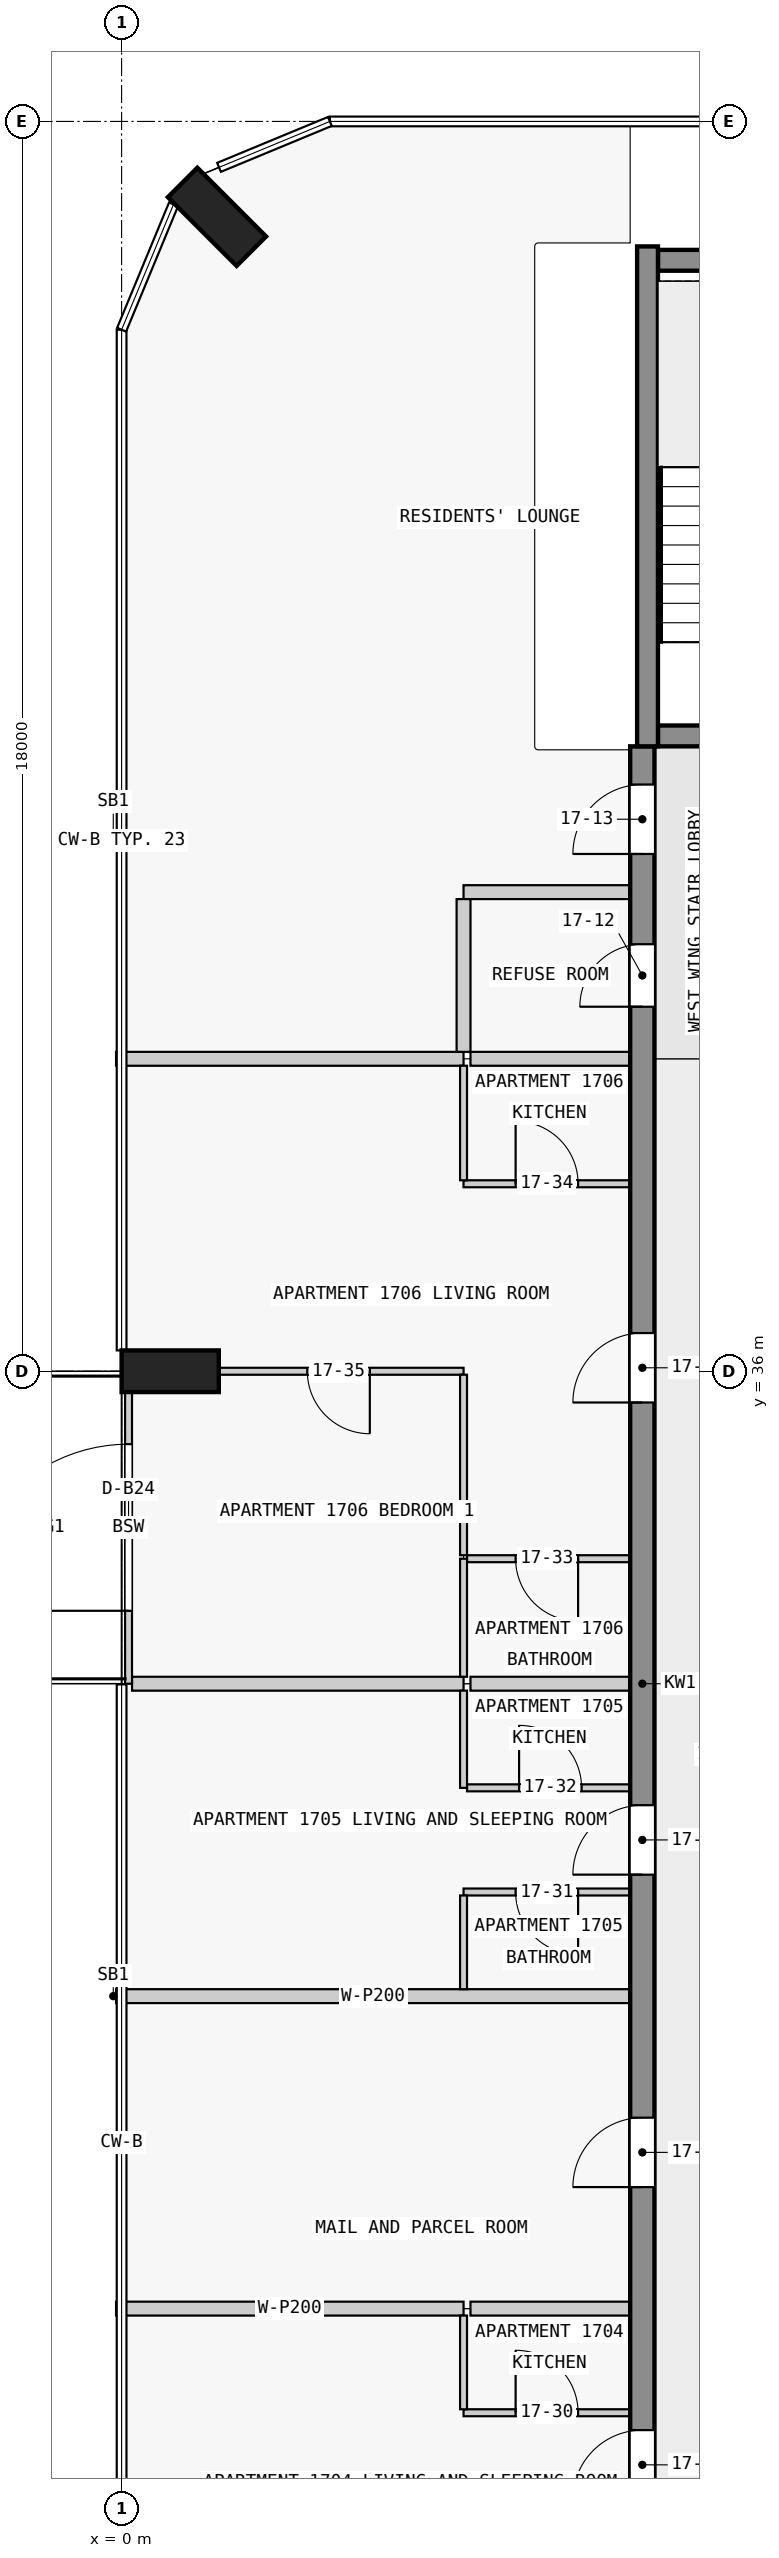
"""IFC4 building model, lengths in metres.
Left out: names, types, materials, properties, quantities, classifications, styles, units other than length and angle.
Written with IfcOpenShell. Run it as: python <this file> out.ifc"""

import sys

from ifc_helpers import new_model, si_unit, direction, frame, frame_2d, origin, origin_2d, place, context, subcontext, project, spatial, rectangle, extrude, element, fill, save


model = new_model("IFC4")
c1 = context("Model", 3, precision=1e-05, world=origin(), true_north=direction((0.0, 1.0)))
c2 = subcontext(c1, "Body", "Model", "MODEL_VIEW")
j1 = project(units=[si_unit("LENGTHUNIT", "METRE"), si_unit("PLANEANGLEUNIT", "RADIAN")], contexts=[c1])
p1 = place(None, origin())
s1 = spatial("IfcSite", under=j1, at=p1, CompositionType="ELEMENT")
p2 = place(p1, origin())
s2 = spatial("IfcBuilding", under=s1, at=p2, CompositionType="ELEMENT")
p3 = place(p2, frame((0.0, 0.0, 68.8)))
s3 = spatial("IfcBuildingStorey", under=s2, at=p3, CompositionType="ELEMENT", Elevation=68.8)
for number, where, z_axis, x_axis in (
    (1, (1.374, 52.626, 0.0), (0.0, 0.0, 1.0), (0.707, 0.707, 0.0)),
    (2, (0.7, 36.0, 0.0), (0.0, 0.0, 1.0), (0.0, 1.0, 0.0)),
):
    element("IfcColumn", number, at=place(p3, frame(where, z_axis=z_axis, x_axis=x_axis)), inside=s3, PredefinedType="COLUMN", context=c2, shape_type="SweptSolid", body=[
        extrude(rectangle(XDim=0.6, YDim=1.4, at=origin_2d()), origin(), (0.0, 0.0, 1.0), 3.5),
    ])
p4 = place(p3, frame((7.725, 45.15, 0.0), z_axis=(0.0, 0.0, 1.0), x_axis=(1.0, 0.0, 0.0)))
e3 = element("IfcWall", 3, at=p4, inside=s3, PredefinedType="SHEAR", context=c2, shape_type="SweptSolid", body=[
    extrude(rectangle(XDim=2.55, YDim=0.3, at=frame_2d((1.275, 0.0))), origin(), (0.0, 0.0, 1.0), 3.5),
])
p5 = place(p4, frame((0.725, 0.0, 0.0)))
e4 = element("IfcOpeningElement", 4, at=p5, cuts=e3, PredefinedType="OPENING", context=c2, shape_type="SweptSolid", body=[
    extrude(rectangle(XDim=1.1, YDim=2.1, at=frame_2d((0.55, 1.05))), frame((0.0, 0.16, 0.0), z_axis=(0.0, -1.0, 0.0), x_axis=(1.0, 0.0, 0.0)), (0.0, 0.0, 1.0), 0.32),
])
p6 = place(p3, frame((7.725, 52.0, 0.0), z_axis=(0.0, 0.0, 1.0), x_axis=(1.0, 0.0, 0.0)))
e5 = element("IfcWall", 5, at=p6, inside=s3, PredefinedType="SHEAR", context=c2, shape_type="SweptSolid", body=[
    extrude(rectangle(XDim=2.55, YDim=0.3, at=frame_2d((1.275, 0.0))), origin(), (0.0, 0.0, 1.0), 3.5),
])
p7 = place(p3, frame((7.575, 45.0, 0.0), z_axis=(0.0, 0.0, 1.0), x_axis=(0.0, 1.0, 0.0)))
e6 = element("IfcWall", 6, at=p7, inside=s3, PredefinedType="SHEAR", context=c2, shape_type="SweptSolid", body=[
    extrude(rectangle(XDim=7.2, YDim=0.3, at=frame_2d((3.6, 0.0))), origin(), (0.0, 0.0, 1.0), 3.5),
])
p8 = place(p3, frame((7.5, 18.0, 0.0), z_axis=(0.0, 0.0, 1.0), x_axis=(0.0, 1.0, 0.0)))
e7 = element("IfcWall", 7, at=p8, inside=s3, PredefinedType="SHEAR", context=c2, shape_type="SweptSolid", body=[
    extrude(rectangle(XDim=27.0, YDim=0.35, at=frame_2d((13.5, 0.0))), origin(), (0.0, 0.0, 1.0), 3.2),
])
p9 = place(p8, frame((1.75, 0.0, 0.0)))
e8 = element("IfcOpeningElement", 8, at=p9, cuts=e7, PredefinedType="OPENING", context=c2, shape_type="SweptSolid", body=[
    extrude(rectangle(XDim=1.0, YDim=2.1, at=frame_2d((0.5, 1.05))), frame((0.0, 0.185, 0.0), z_axis=(0.0, -1.0, 0.0), x_axis=(1.0, 0.0, 0.0)), (0.0, 0.0, 1.0), 0.37),
])
p10 = place(p8, frame((6.25, 0.0, 0.0)))
e9 = element("IfcOpeningElement", 9, at=p10, cuts=e7, PredefinedType="OPENING", context=c2, shape_type="SweptSolid", body=[
    extrude(rectangle(XDim=1.0, YDim=2.1, at=frame_2d((0.5, 1.05))), frame((0.0, 0.185, 0.0), z_axis=(0.0, -1.0, 0.0), x_axis=(1.0, 0.0, 0.0)), (0.0, 0.0, 1.0), 0.37),
])
p11 = place(p8, frame((10.75, 0.0, 0.0)))
e10 = element("IfcOpeningElement", 10, at=p11, cuts=e7, PredefinedType="OPENING", context=c2, shape_type="SweptSolid", body=[
    extrude(rectangle(XDim=1.0, YDim=2.1, at=frame_2d((0.5, 1.05))), frame((0.0, 0.185, 0.0), z_axis=(0.0, -1.0, 0.0), x_axis=(1.0, 0.0, 0.0)), (0.0, 0.0, 1.0), 0.37),
])
p12 = place(p8, frame((17.55, 0.0, 0.0)))
e11 = element("IfcOpeningElement", 11, at=p12, cuts=e7, PredefinedType="OPENING", context=c2, shape_type="SweptSolid", body=[
    extrude(rectangle(XDim=1.0, YDim=2.1, at=frame_2d((0.5, 1.05))), frame((0.0, 0.185, 0.0), z_axis=(0.0, -1.0, 0.0), x_axis=(1.0, 0.0, 0.0)), (0.0, 0.0, 1.0), 0.37),
])
p13 = place(p8, frame((23.25, 0.0, 0.0)))
e12 = element("IfcOpeningElement", 12, at=p13, cuts=e7, PredefinedType="OPENING", context=c2, shape_type="SweptSolid", body=[
    extrude(rectangle(XDim=0.9, YDim=2.1, at=frame_2d((0.45, 1.05))), frame((0.0, 0.185, 0.0), z_axis=(0.0, -1.0, 0.0), x_axis=(1.0, 0.0, 0.0)), (0.0, 0.0, 1.0), 0.37),
])
p14 = place(p8, frame((25.45, 0.0, 0.0)))
e13 = element("IfcOpeningElement", 13, at=p14, cuts=e7, PredefinedType="OPENING", context=c2, shape_type="SweptSolid", body=[
    extrude(rectangle(XDim=1.0, YDim=2.1, at=frame_2d((0.5, 1.05))), frame((0.0, 0.185, 0.0), z_axis=(0.0, -1.0, 0.0), x_axis=(1.0, 0.0, 0.0)), (0.0, 0.0, 1.0), 0.37),
])
p15 = place(p3, frame((0.1, 31.5, 0.0), z_axis=(0.0, 0.0, 1.0), x_axis=(0.0, 1.0, 0.0)))
e14 = element("IfcWall", 14, at=p15, inside=s3, PredefinedType="STANDARD", context=c2, shape_type="SweptSolid", body=[
    extrude(rectangle(XDim=4.5, YDim=0.1, at=frame_2d((2.25, 0.0))), origin(), (0.0, 0.0, 1.0), 3.2),
])
p16 = place(p15, frame((1.05, 0.0, 0.0)))
e15 = element("IfcOpeningElement", 15, at=p16, cuts=e14, PredefinedType="OPENING", context=c2, shape_type="SweptSolid", body=[
    extrude(rectangle(XDim=2.4, YDim=2.4, at=frame_2d((1.2, 1.2))), frame((0.0, 0.06, 0.0), z_axis=(0.0, -1.0, 0.0), x_axis=(1.0, 0.0, 0.0)), (0.0, 0.0, 1.0), 0.12),
])
p17 = place(p3, frame((4.925, 21.0, 0.0), z_axis=(0.0, 0.0, 1.0), x_axis=(1.0, 0.0, 0.0)))
e16 = element("IfcWall", 16, at=p17, inside=s3, PredefinedType="PARTITIONING", context=c2, shape_type="SweptSolid", body=[
    extrude(rectangle(XDim=2.4, YDim=0.1, at=frame_2d((1.2, 0.0))), origin(), (0.0, 0.0, 1.0), 3.2),
])
p18 = place(p17, frame((0.75, 0.0, 0.0)))
e17 = element("IfcOpeningElement", 17, at=p18, cuts=e16, PredefinedType="OPENING", context=c2, shape_type="SweptSolid", body=[
    extrude(rectangle(XDim=0.9, YDim=2.1, at=frame_2d((0.45, 1.05))), frame((0.0, 0.06, 0.0), z_axis=(0.0, -1.0, 0.0), x_axis=(1.0, 0.0, 0.0)), (0.0, 0.0, 1.0), 0.12),
])
p19 = place(p3, frame((7.325, 22.5, 0.0), z_axis=(0.0, 0.0, 1.0), x_axis=(-1.0, 0.0, 0.0)))
e18 = element("IfcWall", 18, at=p19, inside=s3, PredefinedType="PARTITIONING", context=c2, shape_type="SweptSolid", body=[
    extrude(rectangle(XDim=2.3, YDim=0.2, at=frame_2d((1.15, 0.0))), origin(), (0.0, 0.0, 1.0), 3.2),
])
p20 = place(p3, frame((-0.08, 22.5, 0.0), z_axis=(0.0, 0.0, 1.0), x_axis=(1.0, 0.0, 0.0)))
e19 = element("IfcWall", 19, at=p20, inside=s3, PredefinedType="PARTITIONING", context=c2, shape_type="SweptSolid", body=[
    extrude(rectangle(XDim=5.005, YDim=0.2, at=frame_2d((2.502, 0.0))), origin(), (0.0, 0.0, 1.0), 3.2),
])
p21 = place(p3, frame((7.325, 27.0, 0.0), z_axis=(0.0, 0.0, 1.0), x_axis=(-1.0, 0.0, 0.0)))
e20 = element("IfcWall", 20, at=p21, inside=s3, PredefinedType="PARTITIONING", context=c2, shape_type="SweptSolid", body=[
    extrude(rectangle(XDim=7.405, YDim=0.2, at=frame_2d((3.703, 0.0))), origin(), (0.0, 0.0, 1.0), 3.2),
])
p22 = place(p3, frame((7.325, 28.5, 0.0), z_axis=(0.0, 0.0, 1.0), x_axis=(-1.0, 0.0, 0.0)))
e21 = element("IfcWall", 21, at=p22, inside=s3, PredefinedType="PARTITIONING", context=c2, shape_type="SweptSolid", body=[
    extrude(rectangle(XDim=2.4, YDim=0.1, at=frame_2d((1.2, 0.0))), origin(), (0.0, 0.0, 1.0), 3.2),
])
p23 = place(p22, frame((0.75, 0.0, 0.0)))
e22 = element("IfcOpeningElement", 22, at=p23, cuts=e21, PredefinedType="OPENING", context=c2, shape_type="SweptSolid", body=[
    extrude(rectangle(XDim=0.9, YDim=2.1, at=frame_2d((0.45, 1.05))), frame((0.0, 0.06, 0.0), z_axis=(0.0, -1.0, 0.0), x_axis=(1.0, 0.0, 0.0)), (0.0, 0.0, 1.0), 0.12),
])
p24 = place(p3, frame((4.975, 30.0, 0.0), z_axis=(0.0, 0.0, 1.0), x_axis=(1.0, 0.0, 0.0)))
e23 = element("IfcWall", 23, at=p24, inside=s3, PredefinedType="PARTITIONING", context=c2, shape_type="SweptSolid", body=[
    extrude(rectangle(XDim=2.35, YDim=0.1, at=frame_2d((1.175, 0.0))), origin(), (0.0, 0.0, 1.0), 3.2),
])
p25 = place(p24, frame((0.75, 0.0, 0.0)))
e24 = element("IfcOpeningElement", 24, at=p25, cuts=e23, PredefinedType="OPENING", context=c2, shape_type="SweptSolid", body=[
    extrude(rectangle(XDim=0.9, YDim=2.1, at=frame_2d((0.45, 1.05))), frame((0.0, 0.06, 0.0), z_axis=(0.0, -1.0, 0.0), x_axis=(1.0, 0.0, 0.0)), (0.0, 0.0, 1.0), 0.12),
])
p26 = place(p3, frame((7.325, 31.5, 0.0), z_axis=(0.0, 0.0, 1.0), x_axis=(-1.0, 0.0, 0.0)))
e25 = element("IfcWall", 25, at=p26, inside=s3, PredefinedType="PARTITIONING", context=c2, shape_type="SweptSolid", body=[
    extrude(rectangle(XDim=2.3, YDim=0.2, at=frame_2d((1.15, 0.0))), origin(), (0.0, 0.0, 1.0), 3.2),
])
p27 = place(p3, frame((0.15, 31.5, 0.0), z_axis=(0.0, 0.0, 1.0), x_axis=(1.0, 0.0, 0.0)))
e26 = element("IfcWall", 26, at=p27, inside=s3, PredefinedType="PARTITIONING", context=c2, shape_type="SweptSolid", body=[
    extrude(rectangle(XDim=4.775, YDim=0.2, at=frame_2d((2.388, 0.0))), origin(), (0.0, 0.0, 1.0), 3.2),
])
p28 = place(p3, frame((7.325, 33.3, 0.0), z_axis=(0.0, 0.0, 1.0), x_axis=(-1.0, 0.0, 0.0)))
e27 = element("IfcWall", 27, at=p28, inside=s3, PredefinedType="PARTITIONING", context=c2, shape_type="SweptSolid", body=[
    extrude(rectangle(XDim=2.35, YDim=0.1, at=frame_2d((1.175, 0.0))), origin(), (0.0, 0.0, 1.0), 3.2),
])
p29 = place(p28, frame((0.75, 0.0, 0.0)))
e28 = element("IfcOpeningElement", 28, at=p29, cuts=e27, PredefinedType="OPENING", context=c2, shape_type="SweptSolid", body=[
    extrude(rectangle(XDim=0.9, YDim=2.1, at=frame_2d((0.45, 1.05))), frame((0.0, 0.06, 0.0), z_axis=(0.0, -1.0, 0.0), x_axis=(1.0, 0.0, 0.0)), (0.0, 0.0, 1.0), 0.12),
])
p30 = place(p3, frame((4.925, 36.0, 0.0), z_axis=(0.0, 0.0, 1.0), x_axis=(-1.0, 0.0, 0.0)))
e29 = element("IfcWall", 29, at=p30, inside=s3, PredefinedType="PARTITIONING", context=c2, shape_type="SweptSolid", body=[
    extrude(rectangle(XDim=3.525, YDim=0.1, at=frame_2d((1.763, 0.0))), origin(), (0.0, 0.0, 1.0), 3.2),
])
p31 = place(p30, frame((1.35, 0.0, 0.0)))
e30 = element("IfcOpeningElement", 30, at=p31, cuts=e29, PredefinedType="OPENING", context=c2, shape_type="SweptSolid", body=[
    extrude(rectangle(XDim=0.9, YDim=2.1, at=frame_2d((0.45, 1.05))), frame((0.0, 0.06, 0.0), z_axis=(0.0, -1.0, 0.0), x_axis=(1.0, 0.0, 0.0)), (0.0, 0.0, 1.0), 0.12),
])
p32 = place(p3, frame((4.925, 38.7, 0.0), z_axis=(0.0, 0.0, 1.0), x_axis=(1.0, 0.0, 0.0)))
e31 = element("IfcWall", 31, at=p32, inside=s3, PredefinedType="PARTITIONING", context=c2, shape_type="SweptSolid", body=[
    extrude(rectangle(XDim=2.4, YDim=0.1, at=frame_2d((1.2, 0.0))), origin(), (0.0, 0.0, 1.0), 3.2),
])
p33 = place(p32, frame((0.75, 0.0, 0.0)))
e32 = element("IfcOpeningElement", 32, at=p33, cuts=e31, PredefinedType="OPENING", context=c2, shape_type="SweptSolid", body=[
    extrude(rectangle(XDim=0.9, YDim=2.1, at=frame_2d((0.45, 1.05))), frame((0.0, 0.06, 0.0), z_axis=(0.0, -1.0, 0.0), x_axis=(1.0, 0.0, 0.0)), (0.0, 0.0, 1.0), 0.12),
])
p34 = place(p3, frame((7.325, 40.5, 0.0), z_axis=(0.0, 0.0, 1.0), x_axis=(-1.0, 0.0, 0.0)))
e33 = element("IfcWall", 33, at=p34, inside=s3, PredefinedType="PARTITIONING", context=c2, shape_type="SweptSolid", body=[
    extrude(rectangle(XDim=2.3, YDim=0.2, at=frame_2d((1.15, 0.0))), origin(), (0.0, 0.0, 1.0), 3.2),
])
p35 = place(p3, frame((-0.08, 40.5, 0.0), z_axis=(0.0, 0.0, 1.0), x_axis=(1.0, 0.0, 0.0)))
e34 = element("IfcWall", 34, at=p35, inside=s3, PredefinedType="PARTITIONING", context=c2, shape_type="SweptSolid", body=[
    extrude(rectangle(XDim=5.005, YDim=0.2, at=frame_2d((2.502, 0.0))), origin(), (0.0, 0.0, 1.0), 3.2),
])
p36 = place(p3, frame((7.325, 42.9, 0.0), z_axis=(0.0, 0.0, 1.0), x_axis=(-1.0, 0.0, 0.0)))
e35 = element("IfcWall", 35, at=p36, inside=s3, PredefinedType="PARTITIONING", context=c2, shape_type="SweptSolid", body=[
    extrude(rectangle(XDim=2.4, YDim=0.2, at=frame_2d((1.2, 0.0))), origin(), (0.0, 0.0, 1.0), 3.2),
])
for number, where, z_axis, x_axis in (
    (36, (4.925, 22.4, 0.0), (0.0, 0.0, 1.0), (0.0, -1.0, 0.0)),
    (37, (4.925, 28.45, 0.0), (0.0, 0.0, 1.0), (0.0, -1.0, 0.0)),
):
    element("IfcWall", number, at=place(p3, frame(where, z_axis=z_axis, x_axis=x_axis)), inside=s3, PredefinedType="PARTITIONING", context=c2, shape_type="SweptSolid", body=[
        extrude(rectangle(XDim=1.35, YDim=0.1, at=frame_2d((0.675, 0.0))), origin(), (0.0, 0.0, 1.0), 3.2),
    ])
p37 = place(p3, frame((4.925, 31.4, 0.0), z_axis=(0.0, 0.0, 1.0), x_axis=(0.0, -1.0, 0.0)))
e38 = element("IfcWall", 38, at=p37, inside=s3, PredefinedType="PARTITIONING", context=c2, shape_type="SweptSolid", body=[
    extrude(rectangle(XDim=1.4, YDim=0.1, at=frame_2d((0.7, 0.0))), origin(), (0.0, 0.0, 1.0), 3.2),
])
p38 = place(p3, frame((4.925, 33.3, 0.0), z_axis=(0.0, 0.0, 1.0), x_axis=(0.0, -1.0, 0.0)))
e39 = element("IfcWall", 39, at=p38, inside=s3, PredefinedType="PARTITIONING", context=c2, shape_type="SweptSolid", body=[
    extrude(rectangle(XDim=1.7, YDim=0.1, at=frame_2d((0.85, 0.0))), origin(), (0.0, 0.0, 1.0), 3.2),
])
p39 = place(p3, frame((4.925, 40.4, 0.0), z_axis=(0.0, 0.0, 1.0), x_axis=(0.0, -1.0, 0.0)))
e40 = element("IfcWall", 40, at=p39, inside=s3, PredefinedType="PARTITIONING", context=c2, shape_type="SweptSolid", body=[
    extrude(rectangle(XDim=1.65, YDim=0.1, at=frame_2d((0.825, 0.0))), origin(), (0.0, 0.0, 1.0), 3.2),
])
p40 = place(p3, frame((4.925, 33.35, 0.0), z_axis=(0.0, 0.0, 1.0), x_axis=(0.0, 1.0, 0.0)))
e41 = element("IfcWall", 41, at=p40, inside=s3, PredefinedType="PARTITIONING", context=c2, shape_type="SweptSolid", body=[
    extrude(rectangle(XDim=2.6, YDim=0.1, at=frame_2d((1.3, 0.0))), origin(), (0.0, 0.0, 1.0), 3.2),
])
p41 = place(p3, frame((4.925, 42.8, 0.0), z_axis=(0.0, 0.0, 1.0), x_axis=(0.0, -1.0, 0.0)))
e42 = element("IfcWall", 42, at=p41, inside=s3, PredefinedType="PARTITIONING", context=c2, shape_type="SweptSolid", body=[
    extrude(rectangle(XDim=2.2, YDim=0.2, at=frame_2d((1.1, 0.0))), origin(), (0.0, 0.0, 1.0), 3.2),
])
p42 = place(p16, origin())
e43 = element("IfcDoor", 43, at=p42, inside=s3, OperationType="SINGLE_SWING_LEFT", PredefinedType="DOOR", context=c2, shape_type="SweptSolid", body=[
    extrude(rectangle(XDim=2.4, YDim=2.4, at=frame_2d((1.2, 1.2))), frame((0.0, 0.025, 0.0), z_axis=(0.0, -1.0, 0.0), x_axis=(1.0, 0.0, 0.0)), (0.0, 0.0, 1.0), 0.05),
])
fill(e15, e43)
p43 = place(p9, origin())
e44 = element("IfcDoor", 44, at=p43, inside=s3, OperationType="SINGLE_SWING_LEFT", PredefinedType="DOOR", context=c2, shape_type="SweptSolid", body=[
    extrude(rectangle(XDim=1.0, YDim=2.1, at=frame_2d((0.5, 1.05))), frame((0.0, 0.025, 0.0), z_axis=(0.0, -1.0, 0.0), x_axis=(1.0, 0.0, 0.0)), (0.0, 0.0, 1.0), 0.05),
])
fill(e8, e44)
p44 = place(p10, origin())
e45 = element("IfcDoor", 45, at=p44, inside=s3, OperationType="SINGLE_SWING_LEFT", PredefinedType="DOOR", context=c2, shape_type="SweptSolid", body=[
    extrude(rectangle(XDim=1.0, YDim=2.1, at=frame_2d((0.5, 1.05))), frame((0.0, 0.025, 0.0), z_axis=(0.0, -1.0, 0.0), x_axis=(1.0, 0.0, 0.0)), (0.0, 0.0, 1.0), 0.05),
])
fill(e9, e45)
p45 = place(p11, origin())
e46 = element("IfcDoor", 46, at=p45, inside=s3, OperationType="SINGLE_SWING_LEFT", PredefinedType="DOOR", context=c2, shape_type="SweptSolid", body=[
    extrude(rectangle(XDim=1.0, YDim=2.1, at=frame_2d((0.5, 1.05))), frame((0.0, 0.025, 0.0), z_axis=(0.0, -1.0, 0.0), x_axis=(1.0, 0.0, 0.0)), (0.0, 0.0, 1.0), 0.05),
])
fill(e10, e46)
p46 = place(p12, origin())
e47 = element("IfcDoor", 47, at=p46, inside=s3, OperationType="SINGLE_SWING_RIGHT", PredefinedType="DOOR", context=c2, shape_type="SweptSolid", body=[
    extrude(rectangle(XDim=1.0, YDim=2.1, at=frame_2d((0.5, 1.05))), frame((0.0, 0.025, 0.0), z_axis=(0.0, -1.0, 0.0), x_axis=(1.0, 0.0, 0.0)), (0.0, 0.0, 1.0), 0.05),
])
fill(e11, e47)
p47 = place(p13, origin())
e48 = element("IfcDoor", 48, at=p47, inside=s3, OperationType="SINGLE_SWING_RIGHT", PredefinedType="DOOR", context=c2, shape_type="SweptSolid", body=[
    extrude(rectangle(XDim=0.9, YDim=2.1, at=frame_2d((0.45, 1.05))), frame((0.0, 0.025, 0.0), z_axis=(0.0, -1.0, 0.0), x_axis=(1.0, 0.0, 0.0)), (0.0, 0.0, 1.0), 0.05),
])
fill(e12, e48)
p48 = place(p14, origin())
e49 = element("IfcDoor", 49, at=p48, inside=s3, OperationType="SINGLE_SWING_RIGHT", PredefinedType="DOOR", context=c2, shape_type="SweptSolid", body=[
    extrude(rectangle(XDim=1.0, YDim=2.1, at=frame_2d((0.5, 1.05))), frame((0.0, 0.025, 0.0), z_axis=(0.0, -1.0, 0.0), x_axis=(1.0, 0.0, 0.0)), (0.0, 0.0, 1.0), 0.05),
])
fill(e13, e49)
p49 = place(p18, origin())
e50 = element("IfcDoor", 50, at=p49, inside=s3, OperationType="SINGLE_SWING_LEFT", PredefinedType="DOOR", context=c2, shape_type="SweptSolid", body=[
    extrude(rectangle(XDim=0.9, YDim=2.1, at=frame_2d((0.45, 1.05))), frame((0.0, 0.025, 0.0), z_axis=(0.0, -1.0, 0.0), x_axis=(1.0, 0.0, 0.0)), (0.0, 0.0, 1.0), 0.05),
])
fill(e17, e50)
p50 = place(p23, origin())
e51 = element("IfcDoor", 51, at=p50, inside=s3, OperationType="SINGLE_SWING_LEFT", PredefinedType="DOOR", context=c2, shape_type="SweptSolid", body=[
    extrude(rectangle(XDim=0.9, YDim=2.1, at=frame_2d((0.45, 1.05))), frame((0.0, 0.025, 0.0), z_axis=(0.0, -1.0, 0.0), x_axis=(1.0, 0.0, 0.0)), (0.0, 0.0, 1.0), 0.05),
])
fill(e22, e51)
p51 = place(p25, origin())
e52 = element("IfcDoor", 52, at=p51, inside=s3, OperationType="SINGLE_SWING_RIGHT", PredefinedType="DOOR", context=c2, shape_type="SweptSolid", body=[
    extrude(rectangle(XDim=0.9, YDim=2.1, at=frame_2d((0.45, 1.05))), frame((0.0, 0.025, 0.0), z_axis=(0.0, -1.0, 0.0), x_axis=(1.0, 0.0, 0.0)), (0.0, 0.0, 1.0), 0.05),
])
fill(e24, e52)
p52 = place(p29, origin())
e53 = element("IfcDoor", 53, at=p52, inside=s3, OperationType="SINGLE_SWING_RIGHT", PredefinedType="DOOR", context=c2, shape_type="SweptSolid", body=[
    extrude(rectangle(XDim=0.9, YDim=2.1, at=frame_2d((0.45, 1.05))), frame((0.0, 0.025, 0.0), z_axis=(0.0, -1.0, 0.0), x_axis=(1.0, 0.0, 0.0)), (0.0, 0.0, 1.0), 0.05),
])
fill(e28, e53)
p53 = place(p33, origin())
e54 = element("IfcDoor", 54, at=p53, inside=s3, OperationType="SINGLE_SWING_LEFT", PredefinedType="DOOR", context=c2, shape_type="SweptSolid", body=[
    extrude(rectangle(XDim=0.9, YDim=2.1, at=frame_2d((0.45, 1.05))), frame((0.0, 0.025, 0.0), z_axis=(0.0, -1.0, 0.0), x_axis=(1.0, 0.0, 0.0)), (0.0, 0.0, 1.0), 0.05),
])
fill(e32, e54)
p54 = place(p31, origin())
e55 = element("IfcDoor", 55, at=p54, inside=s3, OperationType="SINGLE_SWING_RIGHT", PredefinedType="DOOR", context=c2, shape_type="SweptSolid", body=[
    extrude(rectangle(XDim=0.9, YDim=2.1, at=frame_2d((0.45, 1.05))), frame((0.0, 0.025, 0.0), z_axis=(0.0, -1.0, 0.0), x_axis=(1.0, 0.0, 0.0)), (0.0, 0.0, 1.0), 0.05),
])
fill(e30, e55)
save(model, sys.argv[1])
